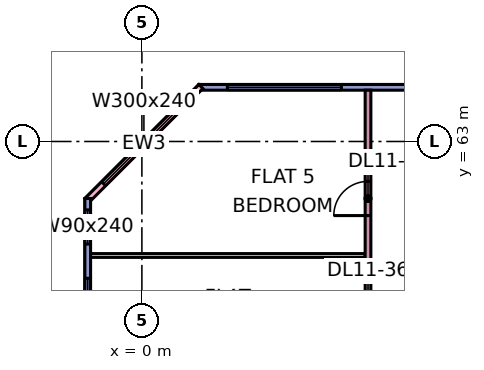
"""IFC4 building model, lengths in metres.
Left out: names, types, materials, properties, quantities, classifications, styles, units other than length and angle.
Written with IfcOpenShell. Run it as: python <this file> out.ifc"""

import sys

from ifc_helpers import new_model, si_unit, direction, frame, frame_2d, origin, place, context, subcontext, project, spatial, rectangle, extrude, element, fill, save


model = new_model("IFC4")
c1 = context("Model", 3, precision=1e-05, world=origin(), true_north=direction((0.0, 1.0)))
c2 = subcontext(c1, "Body", "Model", "MODEL_VIEW")
j1 = project(units=[si_unit("LENGTHUNIT", "METRE"), si_unit("PLANEANGLEUNIT", "RADIAN")], contexts=[c1])
p1 = place(None, origin())
s1 = spatial("IfcSite", under=j1, at=p1, CompositionType="ELEMENT")
p2 = place(p1, origin())
s2 = spatial("IfcBuilding", under=s1, at=p2, CompositionType="ELEMENT")
p3 = place(p2, frame((0.0, 0.0, 56.4)))
s3 = spatial("IfcBuildingStorey", under=s2, at=p3, CompositionType="ELEMENT", Elevation=56.4)
p4 = place(p3, frame((11.925, 64.425, 0.0), z_axis=(0.0, 0.0, 1.0), x_axis=(-1.0, 0.0, 0.0)))
e1 = element("IfcWall", 1, at=p4, inside=s3, PredefinedType="SOLIDWALL", context=c2, shape_type="SweptSolid", body=[
    extrude(rectangle(XDim=10.425, YDim=0.15, at=frame_2d((5.212, 0.0))), origin(), (0.0, 0.0, 1.0), 3.35),
])
p5 = place(p4, frame((6.675, 0.0, 0.45)))
e2 = element("IfcOpeningElement", 2, at=p5, cuts=e1, PredefinedType="OPENING", context=c2, shape_type="SweptSolid", body=[
    extrude(rectangle(XDim=3.0, YDim=2.4, at=frame_2d((1.5, 1.2))), frame((0.0, 0.085, 0.0), z_axis=(0.0, -1.0, 0.0), x_axis=(1.0, 0.0, 0.0)), (0.0, 0.0, 1.0), 0.17),
])
p6 = place(p3, frame((1.553, 64.447, 0.0), z_axis=(0.0, 0.0, 1.0), x_axis=(-0.707106781187, -0.707106781187, 0.0)))
e3 = element("IfcWall", 3, at=p6, inside=s3, PredefinedType="SOLIDWALL", context=c2, shape_type="SweptSolid", body=[
    extrude(rectangle(XDim=4.243, YDim=0.15, at=frame_2d((2.121, 0.0))), origin(), (0.0, 0.0, 1.0), 3.35),
])
p7 = place(p6, frame((0.621, 0.0, 0.45)))
e4 = element("IfcOpeningElement", 4, at=p7, cuts=e3, PredefinedType="OPENING", context=c2, shape_type="SweptSolid", body=[
    extrude(rectangle(XDim=3.0, YDim=2.4, at=frame_2d((1.5, 1.2))), frame((0.0, 0.085, 0.0), z_axis=(0.0, -1.0, 0.0), x_axis=(1.0, 0.0, 0.0)), (0.0, 0.0, 1.0), 0.17),
])
p8 = place(p3, frame((-1.425, 61.5, 0.0), z_axis=(0.0, 0.0, 1.0), x_axis=(0.0, -1.0, 0.0)))
e5 = element("IfcWall", 5, at=p8, inside=s3, PredefinedType="SOLIDWALL", context=c2, shape_type="SweptSolid", body=[
    extrude(rectangle(XDim=13.425, YDim=0.15, at=frame_2d((6.712, 0.0))), origin(), (0.0, 0.0, 1.0), 3.35),
])
p9 = place(p8, frame((0.3, 0.0, 0.45)))
e6 = element("IfcOpeningElement", 6, at=p9, cuts=e5, PredefinedType="OPENING", context=c2, shape_type="SweptSolid", body=[
    extrude(rectangle(XDim=0.9, YDim=2.4, at=frame_2d((0.45, 1.2))), frame((0.0, 0.085, 0.0), z_axis=(0.0, -1.0, 0.0), x_axis=(1.0, 0.0, 0.0)), (0.0, 0.0, 1.0), 0.17),
])
p10 = place(p8, frame((2.1, 0.0, 0.45)))
e7 = element("IfcOpeningElement", 7, at=p10, cuts=e5, PredefinedType="OPENING", context=c2, shape_type="SweptSolid", body=[
    extrude(rectangle(XDim=1.8, YDim=2.4, at=frame_2d((0.9, 1.2))), frame((0.0, 0.085, 0.0), z_axis=(0.0, -1.0, 0.0), x_axis=(1.0, 0.0, 0.0)), (0.0, 0.0, 1.0), 0.17),
])
p11 = place(p8, frame((5.1, 0.0, 0.45)))
e8 = element("IfcOpeningElement", 8, at=p11, cuts=e5, PredefinedType="OPENING", context=c2, shape_type="SweptSolid", body=[
    extrude(rectangle(XDim=1.8, YDim=2.4, at=frame_2d((0.9, 1.2))), frame((0.0, 0.085, 0.0), z_axis=(0.0, -1.0, 0.0), x_axis=(1.0, 0.0, 0.0)), (0.0, 0.0, 1.0), 0.17),
])
p12 = place(p8, frame((8.1, 0.0, 0.45)))
e9 = element("IfcOpeningElement", 9, at=p12, cuts=e5, PredefinedType="OPENING", context=c2, shape_type="SweptSolid", body=[
    extrude(rectangle(XDim=1.8, YDim=2.4, at=frame_2d((0.9, 1.2))), frame((0.0, 0.085, 0.0), z_axis=(0.0, -1.0, 0.0), x_axis=(1.0, 0.0, 0.0)), (0.0, 0.0, 1.0), 0.17),
])
p13 = place(p8, frame((11.062, 0.0, 0.45)))
e10 = element("IfcOpeningElement", 10, at=p13, cuts=e5, PredefinedType="OPENING", context=c2, shape_type="SweptSolid", body=[
    extrude(rectangle(XDim=1.8, YDim=2.4, at=frame_2d((0.9, 1.2))), frame((0.0, 0.085, 0.0), z_axis=(0.0, -1.0, 0.0), x_axis=(1.0, 0.0, 0.0)), (0.0, 0.0, 1.0), 0.17),
])
p14 = place(p3, frame((-1.351, 60.0, 0.0), z_axis=(0.0, 0.0, 1.0), x_axis=(1.0, 0.0, 0.0)))
e11 = element("IfcWall", 11, at=p14, inside=s3, PredefinedType="PARTITIONING", context=c2, shape_type="SweptSolid", body=[
    extrude(rectangle(XDim=7.226, YDim=0.1, at=frame_2d((3.613, 0.0))), origin(), (0.0, 0.0, 1.0), 3.35),
])
p15 = place(p3, frame((5.95, 36.1, 0.0), z_axis=(0.0, 0.0, 1.0), x_axis=(0.0, 1.0, 0.0)))
e12 = element("IfcWall", 12, at=p15, inside=s3, PredefinedType="PARTITIONING", context=c2, shape_type="SweptSolid", body=[
    extrude(rectangle(XDim=28.25, YDim=0.15, at=frame_2d((14.125, 0.0))), origin(), (0.0, 0.0, 1.0), 3.35),
])
p16 = place(p15, frame((3.95, 0.0, 0.0)))
e13 = element("IfcOpeningElement", 13, at=p16, cuts=e12, PredefinedType="OPENING", context=c2, shape_type="SweptSolid", body=[
    extrude(rectangle(XDim=0.9, YDim=2.1, at=frame_2d((0.45, 1.05))), frame((0.0, 0.085, 0.0), z_axis=(0.0, -1.0, 0.0), x_axis=(1.0, 0.0, 0.0)), (0.0, 0.0, 1.0), 0.17),
])
p17 = place(p15, frame((12.95, 0.0, 0.0)))
e14 = element("IfcOpeningElement", 14, at=p17, cuts=e12, PredefinedType="OPENING", context=c2, shape_type="SweptSolid", body=[
    extrude(rectangle(XDim=0.9, YDim=2.1, at=frame_2d((0.45, 1.05))), frame((0.0, 0.085, 0.0), z_axis=(0.0, -1.0, 0.0), x_axis=(1.0, 0.0, 0.0)), (0.0, 0.0, 1.0), 0.17),
])
p18 = place(p15, frame((18.95, 0.0, 0.0)))
e15 = element("IfcOpeningElement", 15, at=p18, cuts=e12, PredefinedType="OPENING", context=c2, shape_type="SweptSolid", body=[
    extrude(rectangle(XDim=0.9, YDim=2.1, at=frame_2d((0.45, 1.05))), frame((0.0, 0.085, 0.0), z_axis=(0.0, -1.0, 0.0), x_axis=(1.0, 0.0, 0.0)), (0.0, 0.0, 1.0), 0.17),
])
p19 = place(p15, frame((21.95, 0.0, 0.0)))
e16 = element("IfcOpeningElement", 16, at=p19, cuts=e12, PredefinedType="OPENING", context=c2, shape_type="SweptSolid", body=[
    extrude(rectangle(XDim=0.9, YDim=2.1, at=frame_2d((0.45, 1.05))), frame((0.0, 0.085, 0.0), z_axis=(0.0, -1.0, 0.0), x_axis=(1.0, 0.0, 0.0)), (0.0, 0.0, 1.0), 0.17),
])
p20 = place(p15, frame((24.95, 0.0, 0.0)))
e17 = element("IfcOpeningElement", 17, at=p20, cuts=e12, PredefinedType="OPENING", context=c2, shape_type="SweptSolid", body=[
    extrude(rectangle(XDim=0.9, YDim=2.1, at=frame_2d((0.45, 1.05))), frame((0.0, 0.085, 0.0), z_axis=(0.0, -1.0, 0.0), x_axis=(1.0, 0.0, 0.0)), (0.0, 0.0, 1.0), 0.17),
])
p21 = place(p15, frame((15.95, 0.0, 0.0)))
e18 = element("IfcOpeningElement", 18, at=p21, cuts=e12, PredefinedType="OPENING", context=c2, shape_type="SweptSolid", body=[
    extrude(rectangle(XDim=0.9, YDim=2.1, at=frame_2d((0.45, 1.05))), frame((0.0, 0.085, 0.0), z_axis=(0.0, -1.0, 0.0), x_axis=(1.0, 0.0, 0.0)), (0.0, 0.0, 1.0), 0.17),
])
p22 = place(p15, frame((10.8, 0.0, 0.0)))
e19 = element("IfcOpeningElement", 19, at=p22, cuts=e12, PredefinedType="OPENING", context=c2, shape_type="SweptSolid", body=[
    extrude(rectangle(XDim=0.8, YDim=2.1, at=frame_2d((0.4, 1.05))), frame((0.0, 0.085, 0.0), z_axis=(0.0, -1.0, 0.0), x_axis=(1.0, 0.0, 0.0)), (0.0, 0.0, 1.0), 0.17),
])
p23 = place(p15, frame((0.55, 0.0, 0.0)))
e20 = element("IfcOpeningElement", 20, at=p23, cuts=e12, PredefinedType="OPENING", context=c2, shape_type="SweptSolid", body=[
    extrude(rectangle(XDim=1.6, YDim=2.1, at=frame_2d((0.8, 1.05))), frame((0.0, 0.085, 0.0), z_axis=(0.0, -1.0, 0.0), x_axis=(1.0, 0.0, 0.0)), (0.0, 0.0, 1.0), 0.17),
])
p24 = place(p15, frame((6.95, 0.0, 0.0)))
e21 = element("IfcOpeningElement", 21, at=p24, cuts=e12, PredefinedType="OPENING", context=c2, shape_type="SweptSolid", body=[
    extrude(rectangle(XDim=0.9, YDim=2.1, at=frame_2d((0.45, 1.05))), frame((0.0, 0.085, 0.0), z_axis=(0.0, -1.0, 0.0), x_axis=(1.0, 0.0, 0.0)), (0.0, 0.0, 1.0), 0.17),
])
p25 = place(p5, origin())
e22 = element("IfcWindow", 22, at=p25, inside=s3, PartitioningType="SINGLE_PANEL", PredefinedType="WINDOW", context=c2, shape_type="SweptSolid", body=[
    extrude(rectangle(XDim=3.0, YDim=2.4, at=frame_2d((1.5, 1.2))), frame((0.0, 0.03, 0.0), z_axis=(0.0, -1.0, 0.0), x_axis=(1.0, 0.0, 0.0)), (0.0, 0.0, 1.0), 0.06),
])
fill(e2, e22)
p26 = place(p7, origin())
e23 = element("IfcWindow", 23, at=p26, inside=s3, PartitioningType="SINGLE_PANEL", PredefinedType="WINDOW", context=c2, shape_type="SweptSolid", body=[
    extrude(rectangle(XDim=3.0, YDim=2.4, at=frame_2d((1.5, 1.2))), frame((0.0, 0.03, 0.0), z_axis=(0.0, -1.0, 0.0), x_axis=(1.0, 0.0, 0.0)), (0.0, 0.0, 1.0), 0.06),
])
fill(e4, e23)
p27 = place(p9, origin())
e24 = element("IfcWindow", 24, at=p27, inside=s3, PartitioningType="SINGLE_PANEL", PredefinedType="WINDOW", context=c2, shape_type="SweptSolid", body=[
    extrude(rectangle(XDim=0.9, YDim=2.4, at=frame_2d((0.45, 1.2))), frame((0.0, 0.03, 0.0), z_axis=(0.0, -1.0, 0.0), x_axis=(1.0, 0.0, 0.0)), (0.0, 0.0, 1.0), 0.06),
])
fill(e6, e24)
p28 = place(p10, origin())
e25 = element("IfcWindow", 25, at=p28, inside=s3, PartitioningType="SINGLE_PANEL", PredefinedType="WINDOW", context=c2, shape_type="SweptSolid", body=[
    extrude(rectangle(XDim=1.8, YDim=2.4, at=frame_2d((0.9, 1.2))), frame((0.0, 0.03, 0.0), z_axis=(0.0, -1.0, 0.0), x_axis=(1.0, 0.0, 0.0)), (0.0, 0.0, 1.0), 0.06),
])
fill(e7, e25)
p29 = place(p20, origin())
e26 = element("IfcDoor", 26, at=p29, inside=s3, OperationType="SINGLE_SWING_LEFT", PredefinedType="DOOR", context=c2, shape_type="SweptSolid", body=[
    extrude(rectangle(XDim=0.9, YDim=2.1, at=frame_2d((0.45, 1.05))), frame((0.0, 0.025, 0.0), z_axis=(0.0, -1.0, 0.0), x_axis=(1.0, 0.0, 0.0)), (0.0, 0.0, 1.0), 0.05),
])
fill(e17, e26)
save(model, sys.argv[1])
